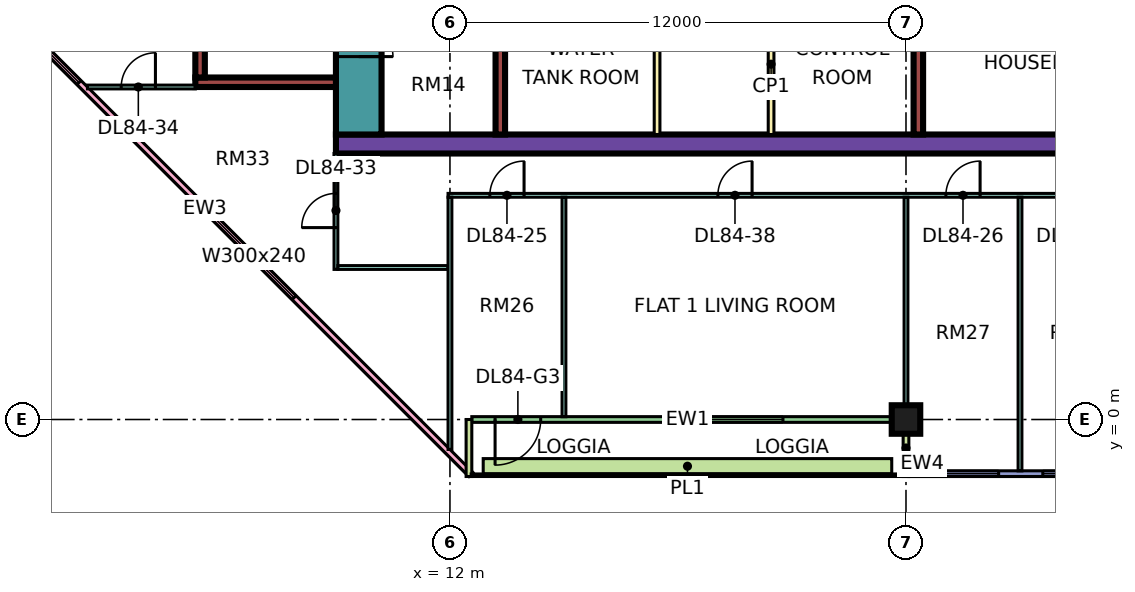
"""IFC4 building model, lengths in metres.
Left out: names, types, materials, properties, quantities, classifications, styles, units other than length and angle.
Written with IfcOpenShell. Run it as: python <this file> out.ifc"""

import sys

from ifc_helpers import new_model, si_unit, direction, frame, frame_2d, origin, origin_2d, place, context, subcontext, project, spatial, rectangle, extrude, element, fill, save


model = new_model("IFC4")
c1 = context("Model", 3, precision=1e-05, world=origin(), true_north=direction((0.0, 1.0)))
c2 = subcontext(c1, "Body", "Model", "MODEL_VIEW")
j1 = project(units=[si_unit("LENGTHUNIT", "METRE"), si_unit("PLANEANGLEUNIT", "RADIAN")], contexts=[c1])
p1 = place(None, origin())
s1 = spatial("IfcSite", under=j1, at=p1, CompositionType="ELEMENT")
p2 = place(p1, origin())
s2 = spatial("IfcBuilding", under=s1, at=p2, CompositionType="ELEMENT")
p3 = place(p2, frame((0.0, 0.0, 361.4)))
s3 = spatial("IfcBuildingStorey", under=s2, at=p3, CompositionType="ELEMENT", Elevation=361.4)
p4 = place(p3, frame((24.0, 0.0, 0.0), z_axis=(0.0, 0.0, 1.0), x_axis=(1.0, 0.0, 0.0)))
e1 = element("IfcColumn", 1, at=p4, inside=s3, PredefinedType="COLUMN", context=c2, shape_type="SweptSolid", body=[
    extrude(rectangle(XDim=0.75, YDim=0.75, at=origin_2d()), origin(), (0.0, 0.0, 1.0), 3.75),
])
p5 = place(p3, frame((9.0, 7.25, 0.0), z_axis=(0.0, 0.0, 1.0), x_axis=(1.0, 0.0, 0.0)))
e2 = element("IfcWall", 2, at=p5, inside=s3, PredefinedType="SHEAR", context=c2, shape_type="SweptSolid", body=[
    extrude(rectangle(XDim=25.0, YDim=0.5, at=frame_2d((12.5, 0.0))), origin(), (0.0, 0.0, 1.0), 3.75),
])
p6 = place(p3, frame((9.6, 7.5, 0.0), z_axis=(0.0, 0.0, 1.0), x_axis=(0.0, 1.0, 0.0)))
e3 = element("IfcWall", 3, at=p6, inside=s3, PredefinedType="SHEAR", context=c2, shape_type="SweptSolid", body=[
    extrude(rectangle(XDim=12.0, YDim=1.2, at=frame_2d((6.0, 0.0))), origin(), (0.0, 0.0, 1.0), 3.75),
])
p7 = place(p6, frame((4.375, 0.0, 0.0)))
e4 = element("IfcOpeningElement", 4, at=p7, cuts=e3, PredefinedType="OPENING", context=c2, shape_type="SweptSolid", body=[
    extrude(rectangle(XDim=1.1, YDim=2.2, at=frame_2d((0.55, 1.1))), frame((0.0, 0.61, 0.0), z_axis=(0.0, -1.0, 0.0), x_axis=(1.0, 0.0, 0.0)), (0.0, 0.0, 1.0), 1.22),
])
p8 = place(p6, frame((6.875, 0.0, 0.0)))
e5 = element("IfcOpeningElement", 5, at=p8, cuts=e3, PredefinedType="OPENING", context=c2, shape_type="SweptSolid", body=[
    extrude(rectangle(XDim=1.1, YDim=2.2, at=frame_2d((0.55, 1.1))), frame((0.0, 0.61, 0.0), z_axis=(0.0, -1.0, 0.0), x_axis=(1.0, 0.0, 0.0)), (0.0, 0.0, 1.0), 1.22),
])
p9 = place(p6, frame((9.85, 0.0, 0.0)))
e6 = element("IfcOpeningElement", 6, at=p9, cuts=e3, PredefinedType="OPENING", context=c2, shape_type="SweptSolid", body=[
    extrude(rectangle(XDim=1.1, YDim=2.2, at=frame_2d((0.55, 1.1))), frame((0.0, 0.61, 0.0), z_axis=(0.0, -1.0, 0.0), x_axis=(1.0, 0.0, 0.0)), (0.0, 0.0, 1.0), 1.22),
])
p10 = place(p6, frame((2.05, 0.0, 0.0)))
e7 = element("IfcOpeningElement", 7, at=p10, cuts=e3, PredefinedType="OPENING", context=c2, shape_type="SweptSolid", body=[
    extrude(rectangle(XDim=0.9, YDim=2.1, at=frame_2d((0.45, 1.05))), frame((0.0, 0.61, 0.0), z_axis=(0.0, -1.0, 0.0), x_axis=(1.0, 0.0, 0.0)), (0.0, 0.0, 1.0), 1.22),
])
p11 = place(p3, frame((13.325, 7.5, 0.0), z_axis=(0.0, 0.0, 1.0), x_axis=(0.0, 1.0, 0.0)))
e8 = element("IfcWall", 8, at=p11, inside=s3, PredefinedType="SHEAR", context=c2, shape_type="SweptSolid", body=[
    extrude(rectangle(XDim=12.0, YDim=0.25, at=frame_2d((6.0, 0.0))), origin(), (0.0, 0.0, 1.0), 3.75),
])
for number, where, z_axis, x_axis in (
    (9, (24.325, 7.5, 0.0), (0.0, 0.0, 1.0), (0.0, 1.0, 0.0)),
    (10, (5.3, 8.875, 0.0), (0.0, 0.0, 1.0), (1.0, 0.0, 0.0)),
):
    element("IfcWall", number, at=place(p3, frame(where, z_axis=z_axis, x_axis=x_axis)), inside=s3, PredefinedType="SHEAR", context=c2, shape_type="SweptSolid", body=[
        extrude(rectangle(XDim=3.7, YDim=0.25, at=frame_2d((1.85, 0.0))), origin(), (0.0, 0.0, 1.0), 3.75),
    ])
p12 = place(p3, frame((5.425, 9.0, 0.0), z_axis=(0.0, 0.0, 1.0), x_axis=(0.0, 1.0, 0.0)))
e11 = element("IfcWall", 11, at=p12, inside=s3, PredefinedType="SHEAR", context=c2, shape_type="SweptSolid", body=[
    extrude(rectangle(XDim=4.0, YDim=0.25, at=frame_2d((2.0, 0.0))), origin(), (0.0, 0.0, 1.0), 3.75),
])
p13 = place(p3, frame((-1.447, 12.553, 0.0), z_axis=(0.0, 0.0, 1.0), x_axis=(0.707106781187, -0.707106781187, 0.0)))
e12 = element("IfcWall", 12, at=p13, inside=s3, PredefinedType="SOLIDWALL", context=c2, shape_type="SweptSolid", body=[
    extrude(rectangle(XDim=19.799, YDim=0.15, at=frame_2d((9.899, 0.0))), origin(), (0.0, 0.0, 1.0), 3.35),
])
p14 = place(p13, frame((2.212, 0.0, 0.45)))
e13 = element("IfcOpeningElement", 13, at=p14, cuts=e12, PredefinedType="OPENING", context=c2, shape_type="SweptSolid", body=[
    extrude(rectangle(XDim=3.0, YDim=2.4, at=frame_2d((1.5, 1.2))), frame((0.0, 0.085, 0.0), z_axis=(0.0, -1.0, 0.0), x_axis=(1.0, 0.0, 0.0)), (0.0, 0.0, 1.0), 0.17),
])
p15 = place(p13, frame((10.216, 0.0, 0.45)))
e14 = element("IfcOpeningElement", 14, at=p15, cuts=e12, PredefinedType="OPENING", context=c2, shape_type="SweptSolid", body=[
    extrude(rectangle(XDim=3.0, YDim=2.4, at=frame_2d((1.5, 1.2))), frame((0.0, 0.085, 0.0), z_axis=(0.0, -1.0, 0.0), x_axis=(1.0, 0.0, 0.0)), (0.0, 0.0, 1.0), 0.17),
])
p16 = place(p3, frame((12.575, 0.0, 0.0), z_axis=(0.0, 0.0, 1.0), x_axis=(1.0, 0.0, 0.0)))
e15 = element("IfcWall", 15, at=p16, inside=s3, PredefinedType="SOLIDWALL", context=c2, shape_type="SweptSolid", body=[
    extrude(rectangle(XDim=11.35, YDim=0.15, at=frame_2d((5.675, 0.0))), origin(), (0.0, 0.0, 1.0), 3.35),
])
p17 = place(p16, frame((0.613, 0.0, 0.0)))
e16 = element("IfcOpeningElement", 16, at=p17, cuts=e15, PredefinedType="OPENING", context=c2, shape_type="SweptSolid", body=[
    extrude(rectangle(XDim=1.2, YDim=2.4, at=frame_2d((0.6, 1.2))), frame((0.0, 0.085, 0.0), z_axis=(0.0, -1.0, 0.0), x_axis=(1.0, 0.0, 0.0)), (0.0, 0.0, 1.0), 0.17),
])
p18 = place(p16, frame((5.188, 0.0, 0.45)))
e17 = element("IfcOpeningElement", 17, at=p18, cuts=e15, PredefinedType="OPENING", context=c2, shape_type="SweptSolid", body=[
    extrude(rectangle(XDim=3.0, YDim=2.4, at=frame_2d((1.5, 1.2))), frame((0.0, 0.085, 0.0), z_axis=(0.0, -1.0, 0.0), x_axis=(1.0, 0.0, 0.0)), (0.0, 0.0, 1.0), 0.17),
])
for number, where, z_axis, x_axis in (
    (18, (12.5, -1.5, 0.0), (0.0, 0.0, 1.0), (0.0, 1.0, 0.0)),
    (19, (24.0, -1.5, 0.0), (0.0, 0.0, 1.0), (0.0, 1.0, 0.0)),
):
    element("IfcWall", number, at=place(p3, frame(where, z_axis=z_axis, x_axis=x_axis)), inside=s3, PredefinedType="SOLIDWALL", context=c2, shape_type="SweptSolid", body=[
        extrude(rectangle(XDim=1.5, YDim=0.15, at=frame_2d((0.75, 0.0))), origin(), (0.0, 0.0, 1.0), 3.35),
    ])
p19 = place(p3, frame((24.075, -1.425, 0.0), z_axis=(0.0, 0.0, 1.0), x_axis=(1.0, 0.0, 0.0)))
e20 = element("IfcWall", 20, at=p19, inside=s3, PredefinedType="SOLIDWALL", context=c2, shape_type="SweptSolid", body=[
    extrude(rectangle(XDim=11.85, YDim=0.15, at=frame_2d((5.925, 0.0))), origin(), (0.0, 0.0, 1.0), 3.35),
])
p20 = place(p19, frame((0.562, 0.0, 0.45)))
e21 = element("IfcOpeningElement", 21, at=p20, cuts=e20, PredefinedType="OPENING", context=c2, shape_type="SweptSolid", body=[
    extrude(rectangle(XDim=1.8, YDim=2.4, at=frame_2d((0.9, 1.2))), frame((0.0, 0.085, 0.0), z_axis=(0.0, -1.0, 0.0), x_axis=(1.0, 0.0, 0.0)), (0.0, 0.0, 1.0), 0.17),
])
p21 = place(p19, frame((3.525, 0.0, 0.45)))
e22 = element("IfcOpeningElement", 22, at=p21, cuts=e20, PredefinedType="OPENING", context=c2, shape_type="SweptSolid", body=[
    extrude(rectangle(XDim=1.8, YDim=2.4, at=frame_2d((0.9, 1.2))), frame((0.0, 0.085, 0.0), z_axis=(0.0, -1.0, 0.0), x_axis=(1.0, 0.0, 0.0)), (0.0, 0.0, 1.0), 0.17),
])
p22 = place(p19, frame((6.525, 0.0, 0.45)))
e23 = element("IfcOpeningElement", 23, at=p22, cuts=e20, PredefinedType="OPENING", context=c2, shape_type="SweptSolid", body=[
    extrude(rectangle(XDim=1.8, YDim=2.4, at=frame_2d((0.9, 1.2))), frame((0.0, 0.085, 0.0), z_axis=(0.0, -1.0, 0.0), x_axis=(1.0, 0.0, 0.0)), (0.0, 0.0, 1.0), 0.17),
])
p23 = place(p19, frame((9.488, 0.0, 0.45)))
e24 = element("IfcOpeningElement", 24, at=p23, cuts=e20, PredefinedType="OPENING", context=c2, shape_type="SweptSolid", body=[
    extrude(rectangle(XDim=1.8, YDim=2.4, at=frame_2d((0.9, 1.2))), frame((0.0, 0.085, 0.0), z_axis=(0.0, -1.0, 0.0), x_axis=(1.0, 0.0, 0.0)), (0.0, 0.0, 1.0), 0.17),
])
p24 = place(p3, frame((12.875, -1.229, 0.0), z_axis=(0.0, 0.0, 1.0), x_axis=(1.0, 0.0, 0.0)))
e25 = element("IfcWall", 25, at=p24, inside=s3, PredefinedType="SOLIDWALL", context=c2, shape_type="SweptSolid", body=[
    extrude(rectangle(XDim=10.75, YDim=0.4, at=frame_2d((5.375, 0.0))), origin(), (0.0, 0.0, 1.0), 0.7),
])
for number, where, z_axis, x_axis in (
    (26, (17.45, 7.5, 0.0), (0.0, 0.0, 1.0), (0.0, 1.0, 0.0)),
    (27, (20.45, 7.5, 0.0), (0.0, 0.0, 1.0), (0.0, 1.0, 0.0)),
):
    element("IfcWall", number, at=place(p3, frame(where, z_axis=z_axis, x_axis=x_axis)), inside=s3, PredefinedType="PARTITIONING", context=c2, shape_type="SweptSolid", body=[
        extrude(rectangle(XDim=3.7, YDim=0.15, at=frame_2d((1.85, 0.0))), origin(), (0.0, 0.0, 1.0), 3.35),
    ])
p25 = place(p3, frame((2.461, 8.75, 0.0), z_axis=(0.0, 0.0, 1.0), x_axis=(1.0, 0.0, 0.0)))
e28 = element("IfcWall", 28, at=p25, inside=s3, PredefinedType="PARTITIONING", context=c2, shape_type="SweptSolid", body=[
    extrude(rectangle(XDim=2.839, YDim=0.1, at=frame_2d((1.419, 0.0))), origin(), (0.0, 0.0, 1.0), 3.35),
])
p26 = place(p25, frame((0.889, 0.0, 0.0)))
e29 = element("IfcOpeningElement", 29, at=p26, cuts=e28, PredefinedType="OPENING", context=c2, shape_type="SweptSolid", body=[
    extrude(rectangle(XDim=0.9, YDim=2.1, at=frame_2d((0.45, 1.05))), frame((0.0, 0.06, 0.0), z_axis=(0.0, -1.0, 0.0), x_axis=(1.0, 0.0, 0.0)), (0.0, 0.0, 1.0), 0.12),
])
p27 = place(p3, frame((9.0, 3.95, 0.0), z_axis=(0.0, 0.0, 1.0), x_axis=(0.0, 1.0, 0.0)))
e30 = element("IfcWall", 30, at=p27, inside=s3, PredefinedType="PARTITIONING", context=c2, shape_type="SweptSolid", body=[
    extrude(rectangle(XDim=3.05, YDim=0.1, at=frame_2d((1.525, 0.0))), origin(), (0.0, 0.0, 1.0), 3.35),
])
p28 = place(p27, frame((1.1, 0.0, 0.0)))
e31 = element("IfcOpeningElement", 31, at=p28, cuts=e30, PredefinedType="OPENING", context=c2, shape_type="SweptSolid", body=[
    extrude(rectangle(XDim=0.9, YDim=2.1, at=frame_2d((0.45, 1.05))), frame((0.0, 0.06, 0.0), z_axis=(0.0, -1.0, 0.0), x_axis=(1.0, 0.0, 0.0)), (0.0, 0.0, 1.0), 0.12),
])
p29 = place(p3, frame((9.05, 4.0, 0.0), z_axis=(0.0, 0.0, 1.0), x_axis=(1.0, 0.0, 0.0)))
e32 = element("IfcWall", 32, at=p29, inside=s3, PredefinedType="PARTITIONING", context=c2, shape_type="SweptSolid", body=[
    extrude(rectangle(XDim=2.9, YDim=0.1, at=frame_2d((1.45, 0.0))), origin(), (0.0, 0.0, 1.0), 3.35),
])
p30 = place(p3, frame((11.95, 5.9, 0.0), z_axis=(0.0, 0.0, 1.0), x_axis=(1.0, 0.0, 0.0)))
e33 = element("IfcWall", 33, at=p30, inside=s3, PredefinedType="PARTITIONING", context=c2, shape_type="SweptSolid", body=[
    extrude(rectangle(XDim=21.1, YDim=0.1, at=frame_2d((10.55, 0.0))), origin(), (0.0, 0.0, 1.0), 3.35),
])
p31 = place(p30, frame((1.1, 0.0, 0.0)))
e34 = element("IfcOpeningElement", 34, at=p31, cuts=e33, PredefinedType="OPENING", context=c2, shape_type="SweptSolid", body=[
    extrude(rectangle(XDim=0.9, YDim=2.1, at=frame_2d((0.45, 1.05))), frame((0.0, 0.06, 0.0), z_axis=(0.0, -1.0, 0.0), x_axis=(1.0, 0.0, 0.0)), (0.0, 0.0, 1.0), 0.12),
])
p32 = place(p30, frame((13.1, 0.0, 0.0)))
e35 = element("IfcOpeningElement", 35, at=p32, cuts=e33, PredefinedType="OPENING", context=c2, shape_type="SweptSolid", body=[
    extrude(rectangle(XDim=0.9, YDim=2.1, at=frame_2d((0.45, 1.05))), frame((0.0, 0.06, 0.0), z_axis=(0.0, -1.0, 0.0), x_axis=(1.0, 0.0, 0.0)), (0.0, 0.0, 1.0), 0.12),
])
p33 = place(p30, frame((16.1, 0.0, 0.0)))
e36 = element("IfcOpeningElement", 36, at=p33, cuts=e33, PredefinedType="OPENING", context=c2, shape_type="SweptSolid", body=[
    extrude(rectangle(XDim=0.9, YDim=2.1, at=frame_2d((0.45, 1.05))), frame((0.0, 0.06, 0.0), z_axis=(0.0, -1.0, 0.0), x_axis=(1.0, 0.0, 0.0)), (0.0, 0.0, 1.0), 0.12),
])
p34 = place(p30, frame((7.1, 0.0, 0.0)))
e37 = element("IfcOpeningElement", 37, at=p34, cuts=e33, PredefinedType="OPENING", context=c2, shape_type="SweptSolid", body=[
    extrude(rectangle(XDim=0.9, YDim=2.1, at=frame_2d((0.45, 1.05))), frame((0.0, 0.06, 0.0), z_axis=(0.0, -1.0, 0.0), x_axis=(1.0, 0.0, 0.0)), (0.0, 0.0, 1.0), 0.12),
])
p35 = place(p3, frame((12.0, -0.788, 0.0), z_axis=(0.0, 0.0, 1.0), x_axis=(0.0, 1.0, 0.0)))
e38 = element("IfcWall", 38, at=p35, inside=s3, PredefinedType="PARTITIONING", context=c2, shape_type="SweptSolid", body=[
    extrude(rectangle(XDim=6.638, YDim=0.1, at=frame_2d((3.319, 0.0))), origin(), (0.0, 0.0, 1.0), 3.35),
])
p36 = place(p3, frame((15.0, 0.074, 0.0), z_axis=(0.0, 0.0, 1.0), x_axis=(0.0, 1.0, 0.0)))
e39 = element("IfcWall", 39, at=p36, inside=s3, PredefinedType="PARTITIONING", context=c2, shape_type="SweptSolid", body=[
    extrude(rectangle(XDim=5.776, YDim=0.1, at=frame_2d((2.888, 0.0))), origin(), (0.0, 0.0, 1.0), 3.35),
])
p37 = place(p3, frame((24.0, 0.0, 0.0), z_axis=(0.0, 0.0, 1.0), x_axis=(0.0, 1.0, 0.0)))
e40 = element("IfcWall", 40, at=p37, inside=s3, PredefinedType="PARTITIONING", context=c2, shape_type="SweptSolid", body=[
    extrude(rectangle(XDim=5.85, YDim=0.1, at=frame_2d((2.925, 0.0))), origin(), (0.0, 0.0, 1.0), 3.35),
])
p38 = place(p3, frame((27.0, -1.351, 0.0), z_axis=(0.0, 0.0, 1.0), x_axis=(0.0, 1.0, 0.0)))
e41 = element("IfcWall", 41, at=p38, inside=s3, PredefinedType="PARTITIONING", context=c2, shape_type="SweptSolid", body=[
    extrude(rectangle(XDim=7.201, YDim=0.1, at=frame_2d((3.601, 0.0))), origin(), (0.0, 0.0, 1.0), 3.35),
])
p39 = place(p14, origin())
e42 = element("IfcWindow", 42, at=p39, inside=s3, PartitioningType="SINGLE_PANEL", PredefinedType="WINDOW", context=c2, shape_type="SweptSolid", body=[
    extrude(rectangle(XDim=3.0, YDim=2.4, at=frame_2d((1.5, 1.2))), frame((0.0, 0.03, 0.0), z_axis=(0.0, -1.0, 0.0), x_axis=(1.0, 0.0, 0.0)), (0.0, 0.0, 1.0), 0.06),
])
fill(e13, e42)
p40 = place(p15, origin())
e43 = element("IfcWindow", 43, at=p40, inside=s3, PartitioningType="SINGLE_PANEL", PredefinedType="WINDOW", context=c2, shape_type="SweptSolid", body=[
    extrude(rectangle(XDim=3.0, YDim=2.4, at=frame_2d((1.5, 1.2))), frame((0.0, 0.03, 0.0), z_axis=(0.0, -1.0, 0.0), x_axis=(1.0, 0.0, 0.0)), (0.0, 0.0, 1.0), 0.06),
])
fill(e14, e43)
p41 = place(p17, frame((1.2, 0.0, 0.0), z_axis=(0.0, 0.0, 1.0), x_axis=(-1.0, 0.0, 0.0)))
e44 = element("IfcDoor", 44, at=p41, inside=s3, OperationType="DOUBLE_DOOR_SINGLE_SWING", PredefinedType="DOOR", context=c2, shape_type="SweptSolid", body=[
    extrude(rectangle(XDim=1.2, YDim=2.4, at=frame_2d((0.6, 1.2))), frame((0.0, 0.025, 0.0), z_axis=(0.0, -1.0, 0.0), x_axis=(1.0, 0.0, 0.0)), (0.0, 0.0, 1.0), 0.05),
])
fill(e16, e44)
p42 = place(p18, origin())
e45 = element("IfcWindow", 45, at=p42, inside=s3, PartitioningType="SINGLE_PANEL", PredefinedType="WINDOW", context=c2, shape_type="SweptSolid", body=[
    extrude(rectangle(XDim=3.0, YDim=2.4, at=frame_2d((1.5, 1.2))), frame((0.0, 0.03, 0.0), z_axis=(0.0, -1.0, 0.0), x_axis=(1.0, 0.0, 0.0)), (0.0, 0.0, 1.0), 0.06),
])
fill(e17, e45)
p43 = place(p20, origin())
e46 = element("IfcWindow", 46, at=p43, inside=s3, PartitioningType="SINGLE_PANEL", PredefinedType="WINDOW", context=c2, shape_type="SweptSolid", body=[
    extrude(rectangle(XDim=1.8, YDim=2.4, at=frame_2d((0.9, 1.2))), frame((0.0, 0.03, 0.0), z_axis=(0.0, -1.0, 0.0), x_axis=(1.0, 0.0, 0.0)), (0.0, 0.0, 1.0), 0.06),
])
fill(e21, e46)
p44 = place(p21, origin())
e47 = element("IfcWindow", 47, at=p44, inside=s3, PartitioningType="SINGLE_PANEL", PredefinedType="WINDOW", context=c2, shape_type="SweptSolid", body=[
    extrude(rectangle(XDim=1.8, YDim=2.4, at=frame_2d((0.9, 1.2))), frame((0.0, 0.03, 0.0), z_axis=(0.0, -1.0, 0.0), x_axis=(1.0, 0.0, 0.0)), (0.0, 0.0, 1.0), 0.06),
])
fill(e22, e47)
p45 = place(p10, frame((0.9, 0.0, 0.0), z_axis=(0.0, 0.0, 1.0), x_axis=(-1.0, 0.0, 0.0)))
e48 = element("IfcDoor", 48, at=p45, inside=s3, OperationType="SINGLE_SWING_LEFT", PredefinedType="DOOR", context=c2, shape_type="SweptSolid", body=[
    extrude(rectangle(XDim=0.9, YDim=2.1, at=frame_2d((0.45, 1.05))), frame((0.0, 0.025, 0.0), z_axis=(0.0, -1.0, 0.0), x_axis=(1.0, 0.0, 0.0)), (0.0, 0.0, 1.0), 0.05),
])
fill(e7, e48)
p46 = place(p31, frame((0.9, 0.0, 0.0), z_axis=(0.0, 0.0, 1.0), x_axis=(-1.0, 0.0, 0.0)))
e49 = element("IfcDoor", 49, at=p46, inside=s3, OperationType="SINGLE_SWING_RIGHT", PredefinedType="DOOR", context=c2, shape_type="SweptSolid", body=[
    extrude(rectangle(XDim=0.9, YDim=2.1, at=frame_2d((0.45, 1.05))), frame((0.0, 0.025, 0.0), z_axis=(0.0, -1.0, 0.0), x_axis=(1.0, 0.0, 0.0)), (0.0, 0.0, 1.0), 0.05),
])
fill(e34, e49)
p47 = place(p32, frame((0.9, 0.0, 0.0), z_axis=(0.0, 0.0, 1.0), x_axis=(-1.0, 0.0, 0.0)))
e50 = element("IfcDoor", 50, at=p47, inside=s3, OperationType="SINGLE_SWING_RIGHT", PredefinedType="DOOR", context=c2, shape_type="SweptSolid", body=[
    extrude(rectangle(XDim=0.9, YDim=2.1, at=frame_2d((0.45, 1.05))), frame((0.0, 0.025, 0.0), z_axis=(0.0, -1.0, 0.0), x_axis=(1.0, 0.0, 0.0)), (0.0, 0.0, 1.0), 0.05),
])
fill(e35, e50)
p48 = place(p28, origin())
e51 = element("IfcDoor", 51, at=p48, inside=s3, OperationType="SINGLE_SWING_LEFT", PredefinedType="DOOR", context=c2, shape_type="SweptSolid", body=[
    extrude(rectangle(XDim=0.9, YDim=2.1, at=frame_2d((0.45, 1.05))), frame((0.0, 0.025, 0.0), z_axis=(0.0, -1.0, 0.0), x_axis=(1.0, 0.0, 0.0)), (0.0, 0.0, 1.0), 0.05),
])
fill(e31, e51)
p49 = place(p26, frame((0.9, 0.0, 0.0), z_axis=(0.0, 0.0, 1.0), x_axis=(-1.0, 0.0, 0.0)))
e52 = element("IfcDoor", 52, at=p49, inside=s3, OperationType="SINGLE_SWING_RIGHT", PredefinedType="DOOR", context=c2, shape_type="SweptSolid", body=[
    extrude(rectangle(XDim=0.9, YDim=2.1, at=frame_2d((0.45, 1.05))), frame((0.0, 0.025, 0.0), z_axis=(0.0, -1.0, 0.0), x_axis=(1.0, 0.0, 0.0)), (0.0, 0.0, 1.0), 0.05),
])
fill(e29, e52)
p50 = place(p34, frame((0.9, 0.0, 0.0), z_axis=(0.0, 0.0, 1.0), x_axis=(-1.0, 0.0, 0.0)))
e53 = element("IfcDoor", 53, at=p50, inside=s3, OperationType="SINGLE_SWING_RIGHT", PredefinedType="DOOR", context=c2, shape_type="SweptSolid", body=[
    extrude(rectangle(XDim=0.9, YDim=2.1, at=frame_2d((0.45, 1.05))), frame((0.0, 0.025, 0.0), z_axis=(0.0, -1.0, 0.0), x_axis=(1.0, 0.0, 0.0)), (0.0, 0.0, 1.0), 0.05),
])
fill(e37, e53)
save(model, sys.argv[1])
